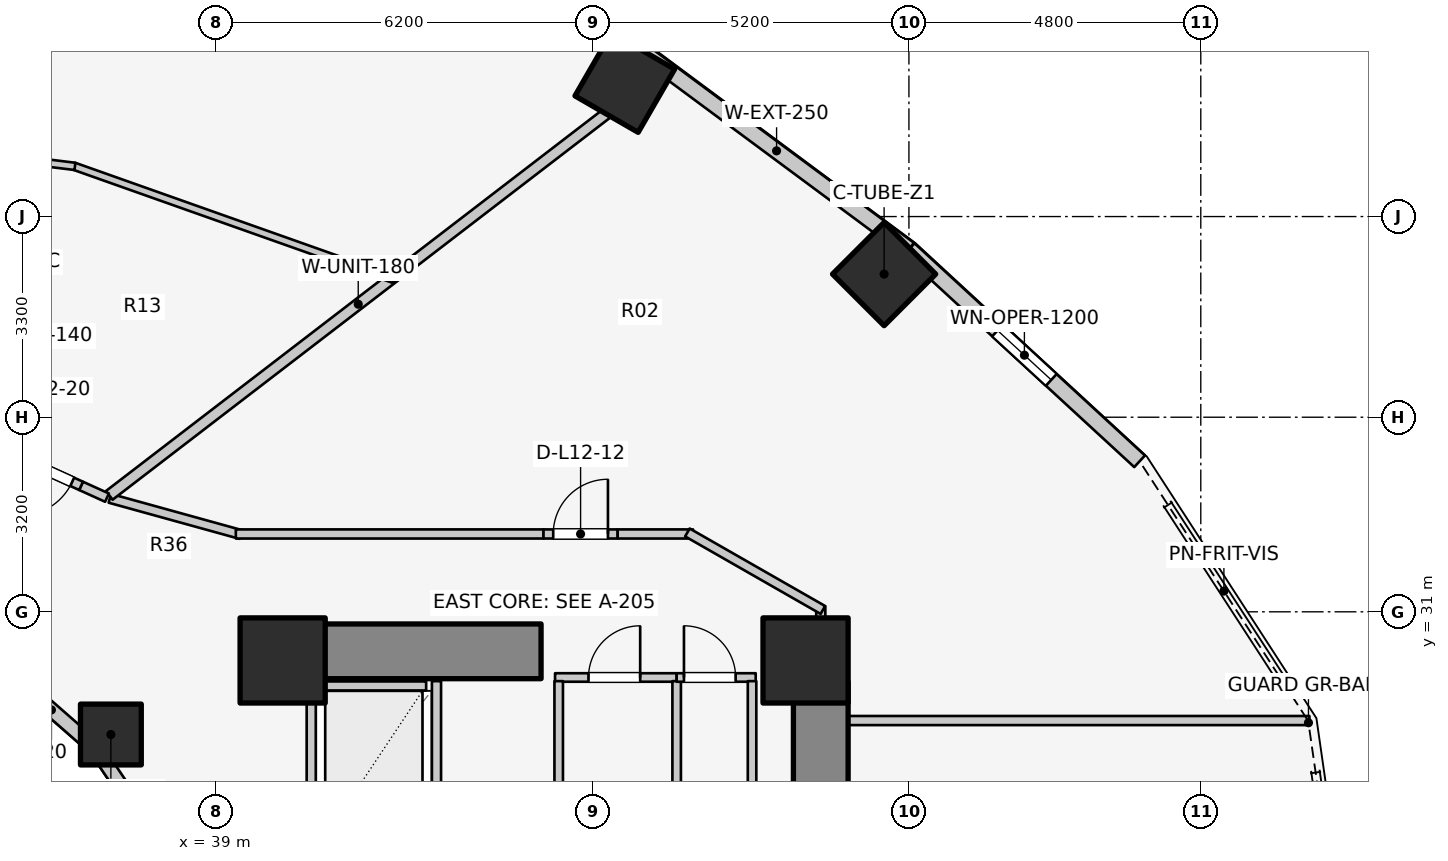
"""IFC4 building model, lengths in metres.
Left out: names, types, materials, properties, quantities, classifications, styles, units other than length and angle.
Written with IfcOpenShell. Run it as: python <this file> out.ifc"""

import sys

from ifc_helpers import new_model, si_unit, direction, frame, frame_2d, origin, origin_2d, place, context, subcontext, project, spatial, rectangle, extrude, element, fill, save


model = new_model("IFC4")
c1 = context("Model", 3, precision=1e-05, world=origin(), true_north=direction((0.0, 1.0)))
c2 = subcontext(c1, "Body", "Model", "MODEL_VIEW")
j1 = project(units=[si_unit("LENGTHUNIT", "METRE"), si_unit("PLANEANGLEUNIT", "RADIAN")], contexts=[c1])
p1 = place(None, origin())
s1 = spatial("IfcSite", under=j1, at=p1, CompositionType="ELEMENT")
p2 = place(p1, origin())
s2 = spatial("IfcBuilding", under=s1, at=p2, CompositionType="ELEMENT")
p3 = place(p2, frame((0.0, 0.0, 43.1)))
s3 = spatial("IfcBuildingStorey", under=s2, at=p3, CompositionType="ELEMENT", Elevation=43.1)
p4 = place(p3, frame((48.95, 17.05, 0.0), z_axis=(0.0, 0.0, 1.0), x_axis=(0.0, 1.0, 0.0)))
e1 = element("IfcWall", 1, at=p4, inside=s3, PredefinedType="SHEAR", context=c2, shape_type="SweptSolid", body=[
    extrude(rectangle(XDim=12.8, YDim=0.9, at=frame_2d((6.4, 0.0))), origin(), (0.0, 0.0, 1.0), 3.1),
])
p5 = place(p3, frame((39.85, 30.35, 0.0), z_axis=(0.0, 0.0, 1.0), x_axis=(1.0, 0.0, 0.0)))
e2 = element("IfcWall", 2, at=p5, inside=s3, PredefinedType="SHEAR", context=c2, shape_type="SweptSolid", body=[
    extrude(rectangle(XDim=4.5, YDim=0.9, at=frame_2d((2.25, 0.0))), origin(), (0.0, 0.0, 1.0), 3.1),
])
for number, where, z_axis, x_axis in (
    (3, (48.7, 30.2, 0.0), (0.0, 0.0, 1.0), (1.0, 0.0, 0.0)),
    (4, (40.1, 30.2, 0.0), (0.0, 0.0, 1.0), (1.0, 0.0, 0.0)),
):
    element("IfcColumn", number, at=place(p3, frame(where, z_axis=z_axis, x_axis=x_axis)), inside=s3, PredefinedType="COLUMN", context=c2, shape_type="SweptSolid", body=[
        extrude(rectangle(XDim=1.4, YDim=1.4, at=origin_2d()), origin(), (0.0, 0.0, 1.0), 3.1),
    ])
p6 = place(p3, frame((37.275, 28.982, 0.0), z_axis=(0.0, 0.0, 1.0), x_axis=(1.0, 0.0, 0.0)))
e5 = element("IfcColumn", 5, at=p6, inside=s3, PredefinedType="COLUMN", context=c2, shape_type="SweptSolid", body=[
    extrude(rectangle(XDim=1.0, YDim=1.0, at=origin_2d()), origin(), (0.0, 0.0, 1.0), 3.1),
])
for number, where, z_axis, x_axis in (
    (6, (49.992, 36.554, 0.0), (0.0, 0.0, 1.0), (0.707, 0.707, 0.0)),
    (7, (45.727, 39.704, 0.0), (0.0, 0.0, 1.0), (0.5, 0.866, 0.0)),
):
    element("IfcColumn", number, at=place(p3, frame(where, z_axis=z_axis, x_axis=x_axis)), inside=s3, PredefinedType="COLUMN", context=c2, shape_type="SweptSolid", body=[
        extrude(rectangle(XDim=1.2, YDim=1.2, at=origin_2d()), origin(), (0.0, 0.0, 1.0), 3.1),
    ])
p7 = place(p3, frame((38.166, 27.06, 0.0), z_axis=(0.0, 0.0, 1.0), x_axis=(-0.558197800898, 0.829707909492, 0.0)))
e8 = element("IfcWall", 8, at=p7, inside=s3, PredefinedType="STANDARD", context=c2, shape_type="SweptSolid", body=[
    extrude(rectangle(XDim=2.027, YDim=0.23, at=frame_2d((1.013, 0.0))), origin(), (0.0, 0.0, 1.0), 1.22),
])
p8 = place(p3, frame((37.035, 28.742, 0.0), z_axis=(0.0, 0.0, 1.0), x_axis=(-0.752576694707, 0.658504607869, 0.0)))
e9 = element("IfcWall", 9, at=p8, inside=s3, PredefinedType="STANDARD", context=c2, shape_type="SweptSolid", body=[
    extrude(rectangle(XDim=1.959, YDim=0.23, at=frame_2d((0.98, 0.0))), origin(), (0.0, 0.0, 1.0), 1.22),
])
p9 = place(p3, frame((54.194, 33.476, 0.0), z_axis=(0.0, 0.0, 1.0), x_axis=(-0.735655109293, 0.67735630223, 0.0)))
e10 = element("IfcWall", 10, at=p9, inside=s3, PredefinedType="STANDARD", context=c2, shape_type="SweptSolid", body=[
    extrude(rectangle(XDim=5.151, YDim=0.26, at=frame_2d((2.575, 0.0))), origin(), (0.0, 0.0, 1.0), 1.22),
])
p10 = place(p9, frame((1.976, 0.0, 0.15)))
e11 = element("IfcOpeningElement", 11, at=p10, cuts=e10, PredefinedType="OPENING", context=c2, shape_type="SweptSolid", body=[
    extrude(rectangle(XDim=1.2, YDim=0.9, at=frame_2d((0.6, 0.45))), frame((0.0, 0.14, 0.0), z_axis=(0.0, -1.0, 0.0), x_axis=(1.0, 0.0, 0.0)), (0.0, 0.0, 1.0), 0.28),
])
p11 = place(p3, frame((50.405, 36.965, 0.0), z_axis=(0.0, 0.0, 1.0), x_axis=(-0.803477531792, 0.595335078679, 0.0)))
e12 = element("IfcWall", 12, at=p11, inside=s3, PredefinedType="STANDARD", context=c2, shape_type="SweptSolid", body=[
    extrude(rectangle(XDim=5.43, YDim=0.26, at=frame_2d((2.715, 0.0))), origin(), (0.0, 0.0, 1.0), 1.22),
])
p12 = place(p3, frame((40.74, 29.78, 0.0), z_axis=(0.0, 0.0, 1.0), x_axis=(1.0, 0.0, 0.0)))
e13 = element("IfcWall", 13, at=p12, inside=s3, PredefinedType="SOLIDWALL", context=c2, shape_type="SweptSolid", body=[
    extrude(rectangle(XDim=1.72, YDim=0.15, at=frame_2d((0.86, 0.0))), origin(), (0.0, 0.0, 1.0), 2.575),
])
for number, where, z_axis, x_axis in (
    (14, (40.57, 27.14, 0.0), (0.0, 0.0, 1.0), (0.0, 1.0, 0.0)),
    (15, (42.63, 27.14, 0.0), (0.0, 0.0, 1.0), (0.0, 1.0, 0.0)),
):
    element("IfcWall", number, at=place(p3, frame(where, z_axis=z_axis, x_axis=x_axis)), inside=s3, PredefinedType="SOLIDWALL", context=c2, shape_type="SweptSolid", body=[
        extrude(rectangle(XDim=2.72, YDim=0.15, at=frame_2d((1.36, 0.0))), origin(), (0.0, 0.0, 1.0), 2.575),
    ])
p13 = place(p3, frame((44.58, 29.92, 0.0), z_axis=(0.0, 0.0, 1.0), x_axis=(1.0, 0.0, 0.0)))
e16 = element("IfcWall", 16, at=p13, inside=s3, PredefinedType="PLUMBINGWALL", context=c2, shape_type="SweptSolid", body=[
    extrude(rectangle(XDim=2.0, YDim=0.14, at=frame_2d((1.0, 0.0))), origin(), (0.0, 0.0, 1.0), 2.575),
])
p14 = place(p13, frame((0.55, 0.0, 0.0)))
e17 = element("IfcOpeningElement", 17, at=p14, cuts=e16, PredefinedType="OPENING", context=c2, shape_type="SweptSolid", body=[
    extrude(rectangle(XDim=0.85, YDim=2.05, at=frame_2d((0.425, 1.025))), frame((0.0, 0.08, 0.0), z_axis=(0.0, -1.0, 0.0), x_axis=(1.0, 0.0, 0.0)), (0.0, 0.0, 1.0), 0.16),
])
for number, where, z_axis, x_axis in (
    (18, (44.64, 25.98, 0.0), (0.0, 0.0, 1.0), (0.0, 1.0, 0.0)),
    (19, (46.58, 25.98, 0.0), (0.0, 0.0, 1.0), (0.0, 1.0, 0.0)),
):
    element("IfcWall", number, at=place(p3, frame(where, z_axis=z_axis, x_axis=x_axis)), inside=s3, PredefinedType="PLUMBINGWALL", context=c2, shape_type="SweptSolid", body=[
        extrude(rectangle(XDim=3.88, YDim=0.14, at=frame_2d((1.94, 0.0))), origin(), (0.0, 0.0, 1.0), 2.575),
    ])
p15 = place(p3, frame((46.58, 29.92, 0.0), z_axis=(0.0, 0.0, 1.0), x_axis=(1.0, 0.0, 0.0)))
e20 = element("IfcWall", 20, at=p15, inside=s3, PredefinedType="PLUMBINGWALL", context=c2, shape_type="SweptSolid", body=[
    extrude(rectangle(XDim=1.3, YDim=0.14, at=frame_2d((0.65, 0.0))), origin(), (0.0, 0.0, 1.0), 2.575),
])
p16 = place(p15, frame((0.12, 0.0, 0.0)))
e21 = element("IfcOpeningElement", 21, at=p16, cuts=e20, PredefinedType="OPENING", context=c2, shape_type="SweptSolid", body=[
    extrude(rectangle(XDim=0.85, YDim=2.05, at=frame_2d((0.425, 1.025))), frame((0.0, 0.08, 0.0), z_axis=(0.0, -1.0, 0.0), x_axis=(1.0, 0.0, 0.0)), (0.0, 0.0, 1.0), 0.16),
])
p17 = place(p3, frame((47.82, 25.98, 0.0), z_axis=(0.0, 0.0, 1.0), x_axis=(0.0, 1.0, 0.0)))
e22 = element("IfcWall", 22, at=p17, inside=s3, PredefinedType="PLUMBINGWALL", context=c2, shape_type="SweptSolid", body=[
    extrude(rectangle(XDim=3.88, YDim=0.14, at=frame_2d((1.94, 0.0))), origin(), (0.0, 0.0, 1.0), 2.575),
])
p18 = place(p3, frame((48.95, 29.212, 0.0), z_axis=(0.0, 0.0, 1.0), x_axis=(1.0, 0.0, 0.0)))
e23 = element("IfcWall", 23, at=p18, inside=s3, PredefinedType="PARTITIONING", context=c2, shape_type="SweptSolid", body=[
    extrude(rectangle(XDim=8.036, YDim=0.15, at=frame_2d((4.018, 0.0))), origin(), (0.0, 0.0, 1.0), 2.575),
])
p19 = place(p3, frame((48.95, 29.8, 0.0), z_axis=(0.0, 0.0, 1.0), x_axis=(0.0, 1.0, 0.0)))
e24 = element("IfcWall", 24, at=p19, inside=s3, PredefinedType="PARTITIONING", context=c2, shape_type="SweptSolid", body=[
    extrude(rectangle(XDim=1.29, YDim=0.15, at=frame_2d((0.645, 0.0))), origin(), (0.0, 0.0, 1.0), 1.22),
])
p20 = place(p3, frame((37.258, 32.867, 0.0), z_axis=(0.0, 0.0, 1.0), x_axis=(0.963833843713, -0.266503886865, 0.0)))
e25 = element("IfcWall", 25, at=p20, inside=s3, PredefinedType="PARTITIONING", context=c2, shape_type="SweptSolid", body=[
    extrude(rectangle(XDim=2.232, YDim=0.15, at=frame_2d((1.116, 0.0))), origin(), (0.0, 0.0, 1.0), 1.22),
])
p21 = place(p3, frame((39.33, 32.28, 0.0), z_axis=(0.0, 0.0, 1.0), x_axis=(1.0, 0.0, 0.0)))
e26 = element("IfcWall", 26, at=p21, inside=s3, PredefinedType="PARTITIONING", context=c2, shape_type="SweptSolid", body=[
    extrude(rectangle(XDim=5.06, YDim=0.15, at=frame_2d((2.53, 0.0))), origin(), (0.0, 0.0, 1.0), 1.22),
])
p22 = place(p3, frame((44.39, 32.28, 0.0), z_axis=(0.0, 0.0, 1.0), x_axis=(1.0, 0.0, 0.0)))
e27 = element("IfcWall", 27, at=p22, inside=s3, PredefinedType="PARTITIONING", context=c2, shape_type="SweptSolid", body=[
    extrude(rectangle(XDim=1.22, YDim=0.15, at=frame_2d((0.61, 0.0))), origin(), (0.0, 0.0, 1.0), 2.575),
])
p23 = place(p22, frame((0.16, 0.0, 0.0)))
e28 = element("IfcOpeningElement", 28, at=p23, cuts=e27, PredefinedType="OPENING", context=c2, shape_type="SweptSolid", body=[
    extrude(rectangle(XDim=0.9, YDim=2.1, at=frame_2d((0.45, 1.05))), frame((0.0, 0.085, 0.0), z_axis=(0.0, -1.0, 0.0), x_axis=(1.0, 0.0, 0.0)), (0.0, 0.0, 1.0), 0.17),
])
p24 = place(p3, frame((45.61, 32.28, 0.0), z_axis=(0.0, 0.0, 1.0), x_axis=(1.0, 0.0, 0.0)))
e29 = element("IfcWall", 29, at=p24, inside=s3, PredefinedType="PARTITIONING", context=c2, shape_type="SweptSolid", body=[
    extrude(rectangle(XDim=1.24, YDim=0.15, at=frame_2d((0.62, 0.0))), origin(), (0.0, 0.0, 1.0), 2.575),
])
p25 = place(p3, frame((46.757, 32.305, 0.0), z_axis=(0.0, 0.0, 1.0), x_axis=(0.867991349648, -0.496579315857, 0.0)))
e30 = element("IfcWall", 30, at=p25, inside=s3, PredefinedType="PARTITIONING", context=c2, shape_type="SweptSolid", body=[
    extrude(rectangle(XDim=2.567, YDim=0.15, at=frame_2d((1.283, 0.0))), origin(), (0.0, 0.0, 1.0), 1.22),
])
p26 = place(p3, frame((37.249, 32.915, 0.0), z_axis=(0.0, 0.0, 1.0), x_axis=(0.793181014702, 0.608985942298, 0.0)))
e31 = element("IfcWall", 31, at=p26, inside=s3, PredefinedType="PARTITIONING", context=c2, shape_type="SweptSolid", body=[
    extrude(rectangle(XDim=10.324, YDim=0.18, at=frame_2d((5.162, 0.0))), origin(), (0.0, 0.0, 1.0), 1.22),
])
p27 = place(p3, frame((41.938, 36.462, 0.0), z_axis=(0.0, 0.0, 1.0), x_axis=(-0.942654689305, 0.333769586287, 0.0)))
e32 = element("IfcWall", 32, at=p27, inside=s3, PredefinedType="MOVABLE", context=c2, shape_type="SweptSolid", body=[
    extrude(rectangle(XDim=5.594, YDim=0.12, at=frame_2d((2.797, 0.0))), origin(), (0.0, 0.0, 1.0), 1.22),
])
p28 = place(p3, frame((36.684, 38.325, 0.0), z_axis=(0.0, 0.0, 1.0), x_axis=(-0.992516476292, 0.122110786945, 0.0)))
e33 = element("IfcWall", 33, at=p28, inside=s3, PredefinedType="MOVABLE", context=c2, shape_type="SweptSolid", body=[
    extrude(rectangle(XDim=1.75, YDim=0.12, at=frame_2d((0.875, 0.0))), origin(), (0.0, 0.0, 1.0), 2.575),
])
p29 = place(p3, frame((37.211, 32.877, 0.0), z_axis=(0.0, 0.0, 1.0), x_axis=(-0.910580557663, 0.413331644091, 0.0)))
e34 = element("IfcWall", 34, at=p29, inside=s3, PredefinedType="PARTITIONING", context=c2, shape_type="SweptSolid", body=[
    extrude(rectangle(XDim=0.469, YDim=0.15, at=frame_2d((0.234, 0.0))), origin(), (0.0, 0.0, 1.0), 2.575),
])
p30 = place(p3, frame((36.785, 33.071, 0.0), z_axis=(0.0, 0.0, 1.0), x_axis=(-0.910491529429, 0.413527719553, 0.0)))
e35 = element("IfcWall", 35, at=p30, inside=s3, PredefinedType="PARTITIONING", context=c2, shape_type="SweptSolid", body=[
    extrude(rectangle(XDim=1.27, YDim=0.15, at=frame_2d((0.635, 0.0))), origin(), (0.0, 0.0, 1.0), 2.16),
])
p31 = place(p30, frame((0.16, 0.0, 0.0)))
e36 = element("IfcOpeningElement", 36, at=p31, cuts=e35, PredefinedType="OPENING", context=c2, shape_type="SweptSolid", body=[
    extrude(rectangle(XDim=0.95, YDim=2.1, at=frame_2d((0.475, 1.05))), frame((0.0, 0.085, 0.0), z_axis=(0.0, -1.0, 0.0), x_axis=(1.0, 0.0, 0.0)), (0.0, 0.0, 1.0), 0.17),
])
p32 = place(p10, origin())
e37 = element("IfcWindow", 37, at=p32, inside=s3, PartitioningType="SINGLE_PANEL", PredefinedType="WINDOW", context=c2, shape_type="SweptSolid", body=[
    extrude(rectangle(XDim=1.2, YDim=0.9, at=frame_2d((0.6, 0.45))), frame((0.0, 0.03, 0.0), z_axis=(0.0, -1.0, 0.0), x_axis=(1.0, 0.0, 0.0)), (0.0, 0.0, 1.0), 0.06),
])
fill(e11, e37)
p33 = place(p14, origin())
e38 = element("IfcDoor", 38, at=p33, inside=s3, OperationType="SINGLE_SWING_RIGHT", PredefinedType="DOOR", context=c2, shape_type="SweptSolid", body=[
    extrude(rectangle(XDim=0.85, YDim=2.05, at=frame_2d((0.425, 1.025))), frame((0.0, 0.025, 0.0), z_axis=(0.0, -1.0, 0.0), x_axis=(1.0, 0.0, 0.0)), (0.0, 0.0, 1.0), 0.05),
])
fill(e17, e38)
p34 = place(p16, origin())
e39 = element("IfcDoor", 39, at=p34, inside=s3, OperationType="SINGLE_SWING_LEFT", PredefinedType="DOOR", context=c2, shape_type="SweptSolid", body=[
    extrude(rectangle(XDim=0.85, YDim=2.05, at=frame_2d((0.425, 1.025))), frame((0.0, 0.025, 0.0), z_axis=(0.0, -1.0, 0.0), x_axis=(1.0, 0.0, 0.0)), (0.0, 0.0, 1.0), 0.05),
])
fill(e21, e39)
p35 = place(p23, origin())
e40 = element("IfcDoor", 40, at=p35, inside=s3, OperationType="SINGLE_SWING_RIGHT", PredefinedType="DOOR", context=c2, shape_type="SweptSolid", body=[
    extrude(rectangle(XDim=0.9, YDim=2.1, at=frame_2d((0.45, 1.05))), frame((0.0, 0.025, 0.0), z_axis=(0.0, -1.0, 0.0), x_axis=(1.0, 0.0, 0.0)), (0.0, 0.0, 1.0), 0.05),
])
fill(e28, e40)
p36 = place(p31, origin())
e41 = element("IfcDoor", 41, at=p36, inside=s3, OperationType="SINGLE_SWING_RIGHT", PredefinedType="DOOR", context=c2, shape_type="SweptSolid", body=[
    extrude(rectangle(XDim=0.95, YDim=2.1, at=frame_2d((0.475, 1.05))), frame((0.0, 0.025, 0.0), z_axis=(0.0, -1.0, 0.0), x_axis=(1.0, 0.0, 0.0)), (0.0, 0.0, 1.0), 0.05),
])
fill(e36, e41)
save(model, sys.argv[1])
